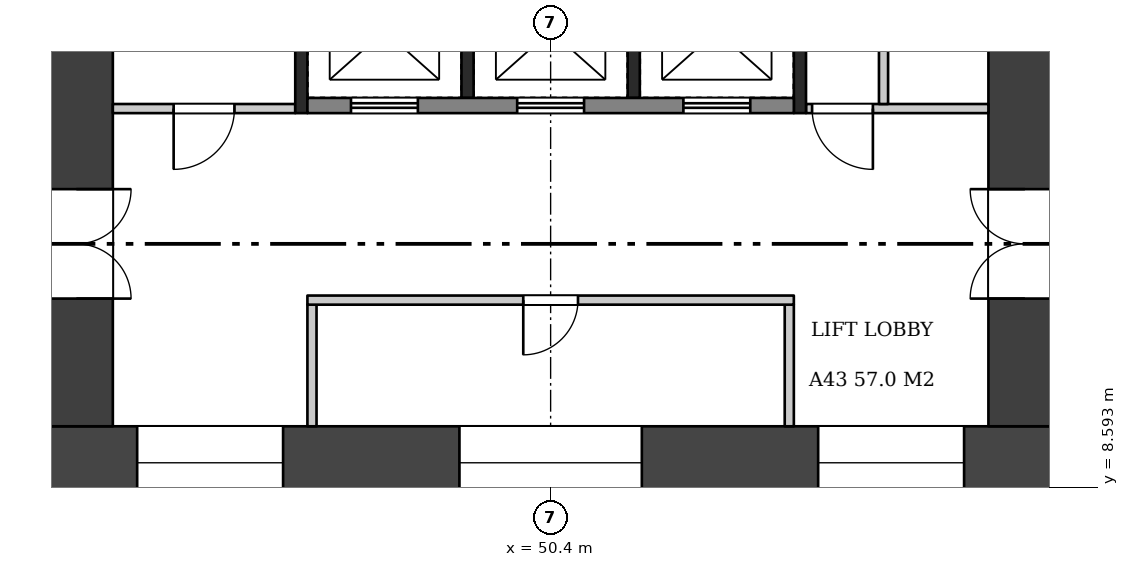
"""IFC4 building model, lengths in metres.
Left out: names, types, materials, properties, quantities, classifications, styles, units other than length and angle.
Written with IfcOpenShell. Run it as: python <this file> out.ifc"""

import sys

from ifc_helpers import new_model, si_unit, direction, frame, frame_2d, origin, place, context, subcontext, project, spatial, rectangle, extrude, element, fill, save


model = new_model("IFC4")
c1 = context("Model", 3, precision=1e-05, world=origin(), true_north=direction((0.0, 1.0)))
c2 = subcontext(c1, "Body", "Model", "MODEL_VIEW")
j1 = project(units=[si_unit("LENGTHUNIT", "METRE"), si_unit("PLANEANGLEUNIT", "RADIAN")], contexts=[c1])
p1 = place(None, origin())
s1 = spatial("IfcSite", under=j1, at=p1, CompositionType="ELEMENT")
p2 = place(p1, origin())
s2 = spatial("IfcBuilding", under=s1, at=p2, CompositionType="ELEMENT")
p3 = place(p2, frame((0.0, 0.0, 168.7)))
s3 = spatial("IfcBuildingStorey", under=s2, at=p3, CompositionType="ELEMENT", Elevation=168.7)
p4 = place(p3, frame((42.0, 9.0, 0.0), z_axis=(0.0, 0.0, 1.0), x_axis=(1.0, 0.0, 0.0)))
e1 = element("IfcWall", 1, at=p4, inside=s3, PredefinedType="SHEAR", context=c2, shape_type="SweptSolid", body=[
    extrude(rectangle(XDim=16.8, YDim=1.2, at=frame_2d((8.4, 0.0))), origin(), (0.0, 0.0, 1.0), 3.22),
])
p5 = place(p4, frame((1.6, 0.0, 0.6)))
e2 = element("IfcOpeningElement", 2, at=p5, cuts=e1, PredefinedType="OPENING", context=c2, shape_type="SweptSolid", body=[
    extrude(rectangle(XDim=2.4, YDim=2.1, at=frame_2d((1.2, 1.05))), frame((0.0, 0.61, 0.0), z_axis=(0.0, -1.0, 0.0), x_axis=(1.0, 0.0, 0.0)), (0.0, 0.0, 1.0), 1.22),
])
p6 = place(p4, frame((6.9, 0.0, 1.6)))
e3 = element("IfcOpeningElement", 3, at=p6, cuts=e1, PredefinedType="OPENING", context=c2, shape_type="SweptSolid", body=[
    extrude(rectangle(XDim=3.0, YDim=1.2, at=frame_2d((1.5, 0.6))), frame((0.0, 0.61, 0.0), z_axis=(0.0, -1.0, 0.0), x_axis=(1.0, 0.0, 0.0)), (0.0, 0.0, 1.0), 1.22),
])
p7 = place(p4, frame((12.8, 0.0, 0.6)))
e4 = element("IfcOpeningElement", 4, at=p7, cuts=e1, PredefinedType="OPENING", context=c2, shape_type="SweptSolid", body=[
    extrude(rectangle(XDim=2.4, YDim=2.1, at=frame_2d((1.2, 1.05))), frame((0.0, 0.61, 0.0), z_axis=(0.0, -1.0, 0.0), x_axis=(1.0, 0.0, 0.0)), (0.0, 0.0, 1.0), 1.22),
])
p8 = place(p3, frame((42.6, 9.6, 0.0), z_axis=(0.0, 0.0, 1.0), x_axis=(0.0, 1.0, 0.0)))
e5 = element("IfcWall", 5, at=p8, inside=s3, PredefinedType="SHEAR", context=c2, shape_type="SweptSolid", body=[
    extrude(rectangle(XDim=14.4, YDim=1.2, at=frame_2d((7.2, 0.0))), origin(), (0.0, 0.0, 1.0), 3.22),
])
p9 = place(p8, frame((2.1, 0.0, 0.0)))
e6 = element("IfcOpeningElement", 6, at=p9, cuts=e5, PredefinedType="OPENING", context=c2, shape_type="SweptSolid", body=[
    extrude(rectangle(XDim=1.8, YDim=2.1, at=frame_2d((0.9, 1.05))), frame((0.0, 0.61, 0.0), z_axis=(0.0, -1.0, 0.0), x_axis=(1.0, 0.0, 0.0)), (0.0, 0.0, 1.0), 1.22),
])
p10 = place(p3, frame((58.2, 9.6, 0.0), z_axis=(0.0, 0.0, 1.0), x_axis=(0.0, 1.0, 0.0)))
e7 = element("IfcWall", 7, at=p10, inside=s3, PredefinedType="SHEAR", context=c2, shape_type="SweptSolid", body=[
    extrude(rectangle(XDim=14.4, YDim=1.2, at=frame_2d((7.2, 0.0))), origin(), (0.0, 0.0, 1.0), 3.22),
])
p11 = place(p10, frame((2.1, 0.0, 0.0)))
e8 = element("IfcOpeningElement", 8, at=p11, cuts=e7, PredefinedType="OPENING", context=c2, shape_type="SweptSolid", body=[
    extrude(rectangle(XDim=1.8, YDim=2.1, at=frame_2d((0.9, 1.05))), frame((0.0, 0.61, 0.0), z_axis=(0.0, -1.0, 0.0), x_axis=(1.0, 0.0, 0.0)), (0.0, 0.0, 1.0), 1.22),
])
for number, where, z_axis, x_axis in (
    (9, (46.475, 9.6, 0.0), (0.0, 0.0, 1.0), (0.0, 1.0, 0.0)),
    (10, (54.325, 9.6, 0.0), (0.0, 0.0, 1.0), (0.0, 1.0, 0.0)),
):
    element("IfcWall", number, at=place(p3, frame(where, z_axis=z_axis, x_axis=x_axis)), inside=s3, PredefinedType="PARTITIONING", context=c2, shape_type="SweptSolid", body=[
        extrude(rectangle(XDim=2.0, YDim=0.15, at=frame_2d((1.0, 0.0))), origin(), (0.0, 0.0, 1.0), 3.22),
    ])
p12 = place(p3, frame((46.4, 11.675, 0.0), z_axis=(0.0, 0.0, 1.0), x_axis=(1.0, 0.0, 0.0)))
e11 = element("IfcWall", 11, at=p12, inside=s3, PredefinedType="PARTITIONING", context=c2, shape_type="SweptSolid", body=[
    extrude(rectangle(XDim=8.0, YDim=0.15, at=frame_2d((4.0, 0.0))), origin(), (0.0, 0.0, 1.0), 3.22),
])
p13 = place(p12, frame((3.55, 0.0, 0.0)))
e12 = element("IfcOpeningElement", 12, at=p13, cuts=e11, PredefinedType="OPENING", context=c2, shape_type="SweptSolid", body=[
    extrude(rectangle(XDim=0.9, YDim=2.1, at=frame_2d((0.45, 1.05))), frame((0.0, 0.085, 0.0), z_axis=(0.0, -1.0, 0.0), x_axis=(1.0, 0.0, 0.0)), (0.0, 0.0, 1.0), 0.17),
])
for number, where, z_axis, x_axis in (
    (13, (49.033, 15.0, 0.0), (0.0, 0.0, 1.0), (0.0, 1.0, 0.0)),
    (14, (51.767, 15.0, 0.0), (0.0, 0.0, 1.0), (0.0, 1.0, 0.0)),
):
    element("IfcWall", number, at=place(p3, frame(where, z_axis=z_axis, x_axis=x_axis)), inside=s3, PredefinedType="SHEAR", context=c2, shape_type="SweptSolid", body=[
        extrude(rectangle(XDim=1.9, YDim=0.2, at=frame_2d((0.95, 0.0))), origin(), (0.0, 0.0, 1.0), 3.22),
    ])
p14 = place(p3, frame((46.4, 14.875, 0.0), z_axis=(0.0, 0.0, 1.0), x_axis=(1.0, 0.0, 0.0)))
e15 = element("IfcWall", 15, at=p14, inside=s3, PredefinedType="SHEAR", context=c2, shape_type="SweptSolid", body=[
    extrude(rectangle(XDim=8.0, YDim=0.25, at=frame_2d((4.0, 0.0))), origin(), (0.0, 0.0, 1.0), 3.22),
])
p15 = place(p14, frame((0.717, 0.0, 0.0)))
e16 = element("IfcOpeningElement", 16, at=p15, cuts=e15, PredefinedType="OPENING", context=c2, shape_type="SweptSolid", body=[
    extrude(rectangle(XDim=1.1, YDim=2.1, at=frame_2d((0.55, 1.05))), frame((0.0, 0.135, 0.0), z_axis=(0.0, -1.0, 0.0), x_axis=(1.0, 0.0, 0.0)), (0.0, 0.0, 1.0), 0.27),
])
p16 = place(p14, frame((3.45, 0.0, 0.0)))
e17 = element("IfcOpeningElement", 17, at=p16, cuts=e15, PredefinedType="OPENING", context=c2, shape_type="SweptSolid", body=[
    extrude(rectangle(XDim=1.1, YDim=2.1, at=frame_2d((0.55, 1.05))), frame((0.0, 0.135, 0.0), z_axis=(0.0, -1.0, 0.0), x_axis=(1.0, 0.0, 0.0)), (0.0, 0.0, 1.0), 0.27),
])
p17 = place(p14, frame((6.183, 0.0, 0.0)))
e18 = element("IfcOpeningElement", 18, at=p17, cuts=e15, PredefinedType="OPENING", context=c2, shape_type="SweptSolid", body=[
    extrude(rectangle(XDim=1.1, YDim=2.1, at=frame_2d((0.55, 1.05))), frame((0.0, 0.135, 0.0), z_axis=(0.0, -1.0, 0.0), x_axis=(1.0, 0.0, 0.0)), (0.0, 0.0, 1.0), 0.27),
])
p18 = place(p3, frame((46.3, 14.75, 0.0), z_axis=(0.0, 0.0, 1.0), x_axis=(0.0, 1.0, 0.0)))
e19 = element("IfcWall", 19, at=p18, inside=s3, PredefinedType="SHEAR", context=c2, shape_type="SweptSolid", body=[
    extrude(rectangle(XDim=2.4, YDim=0.2, at=frame_2d((1.2, 0.0))), origin(), (0.0, 0.0, 1.0), 3.22),
])
p19 = place(p3, frame((43.2, 14.825, 0.0), z_axis=(0.0, 0.0, 1.0), x_axis=(1.0, 0.0, 0.0)))
e20 = element("IfcWall", 20, at=p19, inside=s3, PredefinedType="PARTITIONING", context=c2, shape_type="SweptSolid", body=[
    extrude(rectangle(XDim=3.0, YDim=0.15, at=frame_2d((1.5, 0.0))), origin(), (0.0, 0.0, 1.0), 3.22),
])
p20 = place(p19, frame((1.0, 0.0, 0.0)))
e21 = element("IfcOpeningElement", 21, at=p20, cuts=e20, PredefinedType="OPENING", context=c2, shape_type="SweptSolid", body=[
    extrude(rectangle(XDim=1.0, YDim=2.1, at=frame_2d((0.5, 1.05))), frame((0.0, 0.085, 0.0), z_axis=(0.0, -1.0, 0.0), x_axis=(1.0, 0.0, 0.0)), (0.0, 0.0, 1.0), 0.17),
])
p21 = place(p3, frame((54.5, 14.75, 0.0), z_axis=(0.0, 0.0, 1.0), x_axis=(0.0, 1.0, 0.0)))
e22 = element("IfcWall", 22, at=p21, inside=s3, PredefinedType="SHEAR", context=c2, shape_type="SweptSolid", body=[
    extrude(rectangle(XDim=9.25, YDim=0.2, at=frame_2d((4.625, 0.0))), origin(), (0.0, 0.0, 1.0), 3.22),
])
p22 = place(p3, frame((54.6, 14.825, 0.0), z_axis=(0.0, 0.0, 1.0), x_axis=(1.0, 0.0, 0.0)))
e23 = element("IfcWall", 23, at=p22, inside=s3, PredefinedType="PARTITIONING", context=c2, shape_type="SweptSolid", body=[
    extrude(rectangle(XDim=3.0, YDim=0.15, at=frame_2d((1.5, 0.0))), origin(), (0.0, 0.0, 1.0), 3.22),
])
p23 = place(p22, frame((0.1, 0.0, 0.0)))
e24 = element("IfcOpeningElement", 24, at=p23, cuts=e23, PredefinedType="OPENING", context=c2, shape_type="SweptSolid", body=[
    extrude(rectangle(XDim=1.0, YDim=2.1, at=frame_2d((0.5, 1.05))), frame((0.0, 0.085, 0.0), z_axis=(0.0, -1.0, 0.0), x_axis=(1.0, 0.0, 0.0)), (0.0, 0.0, 1.0), 0.17),
])
p24 = place(p3, frame((55.875, 14.9, 0.0), z_axis=(0.0, 0.0, 1.0), x_axis=(0.0, 1.0, 0.0)))
e25 = element("IfcWall", 25, at=p24, inside=s3, PredefinedType="PARTITIONING", context=c2, shape_type="SweptSolid", body=[
    extrude(rectangle(XDim=9.1, YDim=0.15, at=frame_2d((4.55, 0.0))), origin(), (0.0, 0.0, 1.0), 3.22),
])
p25 = place(p24, frame((4.1, 0.0, 0.0)))
e26 = element("IfcOpeningElement", 26, at=p25, cuts=e25, PredefinedType="OPENING", context=c2, shape_type="SweptSolid", body=[
    extrude(rectangle(XDim=0.9, YDim=2.1, at=frame_2d((0.45, 1.05))), frame((0.0, 0.085, 0.0), z_axis=(0.0, -1.0, 0.0), x_axis=(1.0, 0.0, 0.0)), (0.0, 0.0, 1.0), 0.17),
])
p26 = place(p9, frame((1.8, 0.0, 0.0), z_axis=(0.0, 0.0, 1.0), x_axis=(-1.0, 0.0, 0.0)))
e27 = element("IfcDoor", 27, at=p26, inside=s3, OperationType="DOUBLE_DOOR_SINGLE_SWING", PredefinedType="DOOR", context=c2, shape_type="SweptSolid", body=[
    extrude(rectangle(XDim=1.8, YDim=2.1, at=frame_2d((0.9, 1.05))), frame((0.0, 0.025, 0.0), z_axis=(0.0, -1.0, 0.0), x_axis=(1.0, 0.0, 0.0)), (0.0, 0.0, 1.0), 0.05),
])
fill(e6, e27)
p27 = place(p11, origin())
e28 = element("IfcDoor", 28, at=p27, inside=s3, OperationType="DOUBLE_DOOR_SINGLE_SWING", PredefinedType="DOOR", context=c2, shape_type="SweptSolid", body=[
    extrude(rectangle(XDim=1.8, YDim=2.1, at=frame_2d((0.9, 1.05))), frame((0.0, 0.025, 0.0), z_axis=(0.0, -1.0, 0.0), x_axis=(1.0, 0.0, 0.0)), (0.0, 0.0, 1.0), 0.05),
])
fill(e8, e28)
p28 = place(p13, frame((0.9, 0.0, 0.0), z_axis=(0.0, 0.0, 1.0), x_axis=(-1.0, 0.0, 0.0)))
e29 = element("IfcDoor", 29, at=p28, inside=s3, OperationType="SINGLE_SWING_RIGHT", PredefinedType="DOOR", context=c2, shape_type="SweptSolid", body=[
    extrude(rectangle(XDim=0.9, YDim=2.1, at=frame_2d((0.45, 1.05))), frame((0.0, 0.025, 0.0), z_axis=(0.0, -1.0, 0.0), x_axis=(1.0, 0.0, 0.0)), (0.0, 0.0, 1.0), 0.05),
])
fill(e12, e29)
p29 = place(p15, origin())
e30 = element("IfcDoor", 30, at=p29, inside=s3, OperationType="DOUBLE_DOOR_SLIDING", PredefinedType="DOOR", context=c2, shape_type="SweptSolid", body=[
    extrude(rectangle(XDim=1.1, YDim=2.1, at=frame_2d((0.55, 1.05))), frame((0.0, 0.025, 0.0), z_axis=(0.0, -1.0, 0.0), x_axis=(1.0, 0.0, 0.0)), (0.0, 0.0, 1.0), 0.05),
])
fill(e16, e30)
p30 = place(p16, origin())
e31 = element("IfcDoor", 31, at=p30, inside=s3, OperationType="DOUBLE_DOOR_SLIDING", PredefinedType="DOOR", context=c2, shape_type="SweptSolid", body=[
    extrude(rectangle(XDim=1.1, YDim=2.1, at=frame_2d((0.55, 1.05))), frame((0.0, 0.025, 0.0), z_axis=(0.0, -1.0, 0.0), x_axis=(1.0, 0.0, 0.0)), (0.0, 0.0, 1.0), 0.05),
])
fill(e17, e31)
p31 = place(p17, origin())
e32 = element("IfcDoor", 32, at=p31, inside=s3, OperationType="DOUBLE_DOOR_SLIDING", PredefinedType="DOOR", context=c2, shape_type="SweptSolid", body=[
    extrude(rectangle(XDim=1.1, YDim=2.1, at=frame_2d((0.55, 1.05))), frame((0.0, 0.025, 0.0), z_axis=(0.0, -1.0, 0.0), x_axis=(1.0, 0.0, 0.0)), (0.0, 0.0, 1.0), 0.05),
])
fill(e18, e32)
p32 = place(p20, frame((1.0, 0.0, 0.0), z_axis=(0.0, 0.0, 1.0), x_axis=(-1.0, 0.0, 0.0)))
e33 = element("IfcDoor", 33, at=p32, inside=s3, OperationType="SINGLE_SWING_RIGHT", PredefinedType="DOOR", context=c2, shape_type="SweptSolid", body=[
    extrude(rectangle(XDim=1.0, YDim=2.1, at=frame_2d((0.5, 1.05))), frame((0.0, 0.025, 0.0), z_axis=(0.0, -1.0, 0.0), x_axis=(1.0, 0.0, 0.0)), (0.0, 0.0, 1.0), 0.05),
])
fill(e21, e33)
p33 = place(p23, frame((1.0, 0.0, 0.0), z_axis=(0.0, 0.0, 1.0), x_axis=(-1.0, 0.0, 0.0)))
e34 = element("IfcDoor", 34, at=p33, inside=s3, OperationType="SINGLE_SWING_LEFT", PredefinedType="DOOR", context=c2, shape_type="SweptSolid", body=[
    extrude(rectangle(XDim=1.0, YDim=2.1, at=frame_2d((0.5, 1.05))), frame((0.0, 0.025, 0.0), z_axis=(0.0, -1.0, 0.0), x_axis=(1.0, 0.0, 0.0)), (0.0, 0.0, 1.0), 0.05),
])
fill(e24, e34)
p34 = place(p5, origin())
e35 = element("IfcWindow", 35, at=p34, inside=s3, PartitioningType="SINGLE_PANEL", PredefinedType="WINDOW", context=c2, shape_type="SweptSolid", body=[
    extrude(rectangle(XDim=2.4, YDim=2.1, at=frame_2d((1.2, 1.05))), frame((0.0, 0.03, 0.0), z_axis=(0.0, -1.0, 0.0), x_axis=(1.0, 0.0, 0.0)), (0.0, 0.0, 1.0), 0.06),
])
fill(e2, e35)
p35 = place(p6, origin())
e36 = element("IfcWindow", 36, at=p35, inside=s3, PartitioningType="SINGLE_PANEL", PredefinedType="WINDOW", context=c2, shape_type="SweptSolid", body=[
    extrude(rectangle(XDim=3.0, YDim=1.2, at=frame_2d((1.5, 0.6))), frame((0.0, 0.03, 0.0), z_axis=(0.0, -1.0, 0.0), x_axis=(1.0, 0.0, 0.0)), (0.0, 0.0, 1.0), 0.06),
])
fill(e3, e36)
p36 = place(p7, origin())
e37 = element("IfcWindow", 37, at=p36, inside=s3, PartitioningType="SINGLE_PANEL", PredefinedType="WINDOW", context=c2, shape_type="SweptSolid", body=[
    extrude(rectangle(XDim=2.4, YDim=2.1, at=frame_2d((1.2, 1.05))), frame((0.0, 0.03, 0.0), z_axis=(0.0, -1.0, 0.0), x_axis=(1.0, 0.0, 0.0)), (0.0, 0.0, 1.0), 0.06),
])
fill(e4, e37)
save(model, sys.argv[1])
